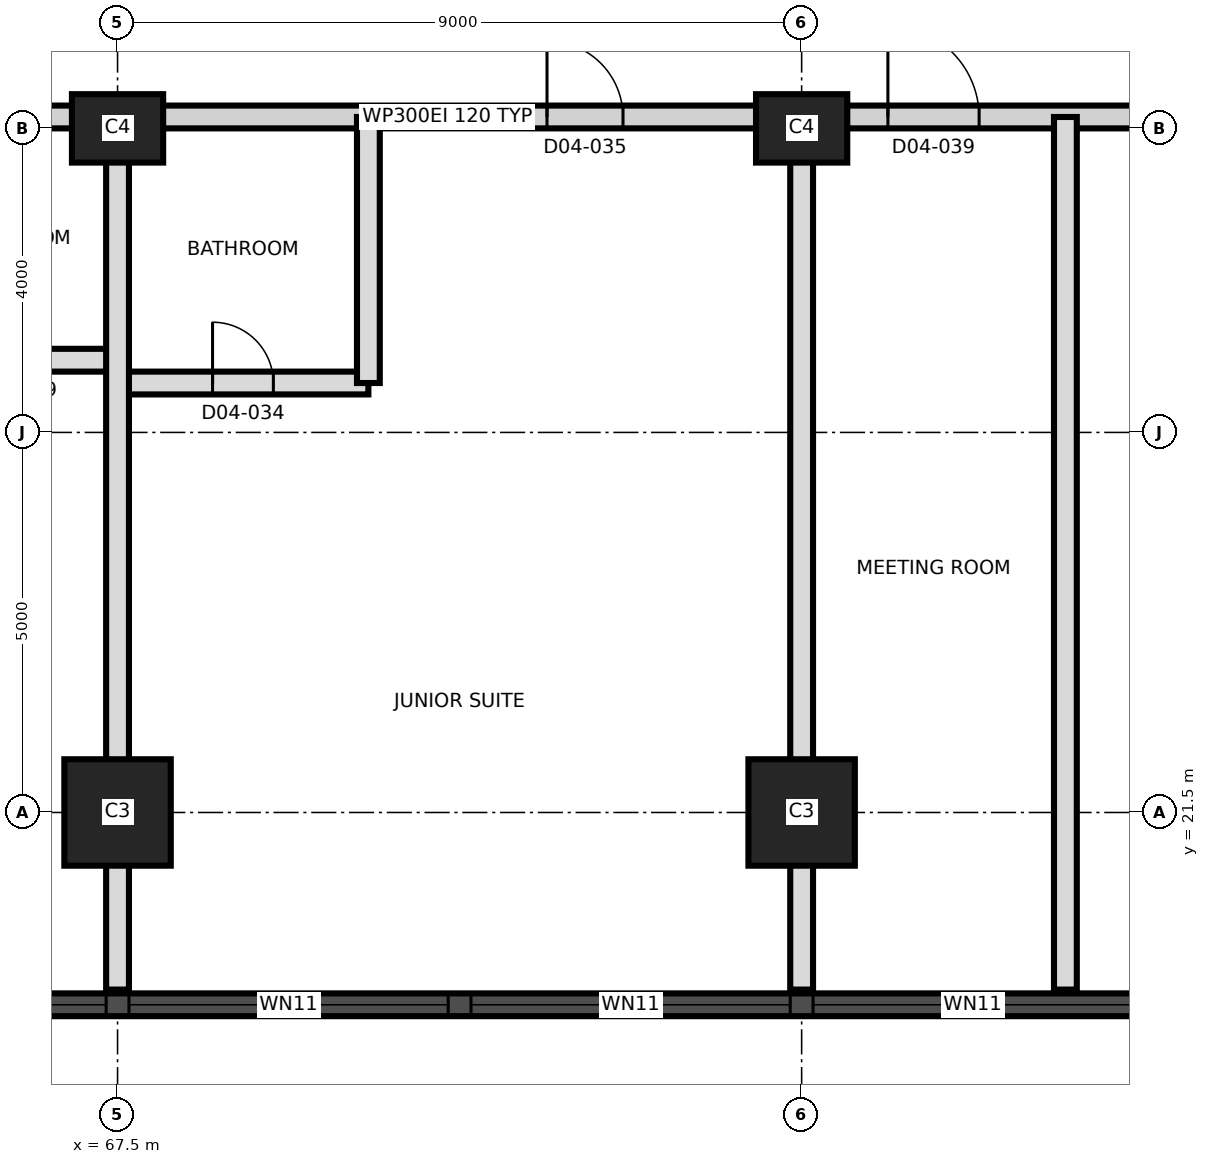
"""IFC4 building model, lengths in metres.
Left out: names, types, materials, properties, quantities, classifications, styles, units other than length and angle.
Written with IfcOpenShell. Run it as: python <this file> out.ifc"""

import sys

from ifc_helpers import new_model, si_unit, direction, frame, frame_2d, origin, origin_2d, place, context, subcontext, project, spatial, rectangle, extrude, element, fill, save


model = new_model("IFC4")
c1 = context("Model", 3, precision=1e-05, world=origin(), true_north=direction((0.0, 1.0)))
c2 = subcontext(c1, "Body", "Model", "MODEL_VIEW")
j1 = project(units=[si_unit("LENGTHUNIT", "METRE"), si_unit("PLANEANGLEUNIT", "RADIAN")], contexts=[c1])
p1 = place(None, origin())
s1 = spatial("IfcSite", under=j1, at=p1, CompositionType="ELEMENT")
p2 = place(p1, origin())
s2 = spatial("IfcBuilding", under=s1, at=p2, CompositionType="ELEMENT")
p3 = place(p2, frame((0.0, 0.0, 63.1)))
s3 = spatial("IfcBuildingStorey", under=s2, at=p3, CompositionType="ELEMENT", Elevation=63.1)
for number, where, z_axis, x_axis in (
    (1, (67.5, 21.5, 0.0), (0.0, 0.0, 1.0), (1.0, 0.0, 0.0)),
    (2, (76.5, 21.5, 0.0), (0.0, 0.0, 1.0), (1.0, 0.0, 0.0)),
):
    element("IfcColumn", number, at=place(p3, frame(where, z_axis=z_axis, x_axis=x_axis)), inside=s3, PredefinedType="COLUMN", context=c2, shape_type="SweptSolid", body=[
        extrude(rectangle(XDim=1.4, YDim=1.4, at=origin_2d()), origin(), (0.0, 0.0, 1.0), 3.7),
    ])
for number, where, z_axis, x_axis in (
    (3, (67.5, 30.5, 0.0), (0.0, 0.0, 1.0), (1.0, 0.0, 0.0)),
    (4, (76.5, 30.5, 0.0), (0.0, 0.0, 1.0), (1.0, 0.0, 0.0)),
):
    element("IfcColumn", number, at=place(p3, frame(where, z_axis=z_axis, x_axis=x_axis)), inside=s3, PredefinedType="COLUMN", context=c2, shape_type="SweptSolid", body=[
        extrude(rectangle(XDim=1.2, YDim=0.9, at=origin_2d()), origin(), (0.0, 0.0, 1.0), 3.7),
    ])
p4 = place(p3, frame((44.01, 18.97, 0.0), z_axis=(0.0, 0.0, 1.0), x_axis=(1.0, 0.0, 0.0)))
e5 = element("IfcWall", 5, at=p4, inside=s3, PredefinedType="SOLIDWALL", context=c2, shape_type="SweptSolid", body=[
    extrude(rectangle(XDim=43.478, YDim=0.3, at=frame_2d((21.739, 0.0))), origin(), (0.0, 0.0, 1.0), 3.4),
])
p5 = place(p4, frame((1.845, 0.0, 0.3)))
e6 = element("IfcOpeningElement", 6, at=p5, cuts=e5, PredefinedType="OPENING", context=c2, shape_type="SweptSolid", body=[
    extrude(rectangle(XDim=1.8, YDim=2.4, at=frame_2d((0.9, 1.2))), frame((0.0, 0.16, 0.0), z_axis=(0.0, -1.0, 0.0), x_axis=(1.0, 0.0, 0.0)), (0.0, 0.0, 1.0), 0.32),
])
p6 = place(p4, frame((5.64, 0.0, 0.9)))
e7 = element("IfcOpeningElement", 7, at=p6, cuts=e5, PredefinedType="OPENING", context=c2, shape_type="SweptSolid", body=[
    extrude(rectangle(XDim=4.2, YDim=1.5, at=frame_2d((2.1, 0.75))), frame((0.0, 0.16, 0.0), z_axis=(0.0, -1.0, 0.0), x_axis=(1.0, 0.0, 0.0)), (0.0, 0.0, 1.0), 0.32),
])
p7 = place(p4, frame((10.14, 0.0, 0.9)))
e8 = element("IfcOpeningElement", 8, at=p7, cuts=e5, PredefinedType="OPENING", context=c2, shape_type="SweptSolid", body=[
    extrude(rectangle(XDim=4.2, YDim=1.5, at=frame_2d((2.1, 0.75))), frame((0.0, 0.16, 0.0), z_axis=(0.0, -1.0, 0.0), x_axis=(1.0, 0.0, 0.0)), (0.0, 0.0, 1.0), 0.32),
])
p8 = place(p4, frame((14.64, 0.0, 0.9)))
e9 = element("IfcOpeningElement", 9, at=p8, cuts=e5, PredefinedType="OPENING", context=c2, shape_type="SweptSolid", body=[
    extrude(rectangle(XDim=4.2, YDim=1.5, at=frame_2d((2.1, 0.75))), frame((0.0, 0.16, 0.0), z_axis=(0.0, -1.0, 0.0), x_axis=(1.0, 0.0, 0.0)), (0.0, 0.0, 1.0), 0.32),
])
p9 = place(p4, frame((19.14, 0.0, 0.9)))
e10 = element("IfcOpeningElement", 10, at=p9, cuts=e5, PredefinedType="OPENING", context=c2, shape_type="SweptSolid", body=[
    extrude(rectangle(XDim=4.2, YDim=1.5, at=frame_2d((2.1, 0.75))), frame((0.0, 0.16, 0.0), z_axis=(0.0, -1.0, 0.0), x_axis=(1.0, 0.0, 0.0)), (0.0, 0.0, 1.0), 0.32),
])
p10 = place(p4, frame((23.64, 0.0, 0.9)))
e11 = element("IfcOpeningElement", 11, at=p10, cuts=e5, PredefinedType="OPENING", context=c2, shape_type="SweptSolid", body=[
    extrude(rectangle(XDim=4.2, YDim=1.5, at=frame_2d((2.1, 0.75))), frame((0.0, 0.16, 0.0), z_axis=(0.0, -1.0, 0.0), x_axis=(1.0, 0.0, 0.0)), (0.0, 0.0, 1.0), 0.32),
])
p11 = place(p4, frame((28.14, 0.0, 0.9)))
e12 = element("IfcOpeningElement", 12, at=p11, cuts=e5, PredefinedType="OPENING", context=c2, shape_type="SweptSolid", body=[
    extrude(rectangle(XDim=4.2, YDim=1.5, at=frame_2d((2.1, 0.75))), frame((0.0, 0.16, 0.0), z_axis=(0.0, -1.0, 0.0), x_axis=(1.0, 0.0, 0.0)), (0.0, 0.0, 1.0), 0.32),
])
p12 = place(p4, frame((32.64, 0.0, 0.9)))
e13 = element("IfcOpeningElement", 13, at=p12, cuts=e5, PredefinedType="OPENING", context=c2, shape_type="SweptSolid", body=[
    extrude(rectangle(XDim=4.2, YDim=1.5, at=frame_2d((2.1, 0.75))), frame((0.0, 0.16, 0.0), z_axis=(0.0, -1.0, 0.0), x_axis=(1.0, 0.0, 0.0)), (0.0, 0.0, 1.0), 0.32),
])
p13 = place(p4, frame((37.14, 0.0, 0.9)))
e14 = element("IfcOpeningElement", 14, at=p13, cuts=e5, PredefinedType="OPENING", context=c2, shape_type="SweptSolid", body=[
    extrude(rectangle(XDim=4.2, YDim=1.5, at=frame_2d((2.1, 0.75))), frame((0.0, 0.16, 0.0), z_axis=(0.0, -1.0, 0.0), x_axis=(1.0, 0.0, 0.0)), (0.0, 0.0, 1.0), 0.32),
])
p14 = place(p3, frame((67.5, 27.15, 0.0), z_axis=(0.0, 0.0, 1.0), x_axis=(1.0, 0.0, 0.0)))
e15 = element("IfcWall", 15, at=p14, inside=s3, PredefinedType="PARTITIONING", context=c2, shape_type="SweptSolid", body=[
    extrude(rectangle(XDim=3.3, YDim=0.3, at=frame_2d((1.65, 0.0))), origin(), (0.0, 0.0, 1.0), 3.4),
])
p15 = place(p14, frame((1.25, 0.0, 0.0)))
e16 = element("IfcOpeningElement", 16, at=p15, cuts=e15, PredefinedType="OPENING", context=c2, shape_type="SweptSolid", body=[
    extrude(rectangle(XDim=0.8, YDim=2.1, at=frame_2d((0.4, 1.05))), frame((0.0, 0.16, 0.0), z_axis=(0.0, -1.0, 0.0), x_axis=(1.0, 0.0, 0.0)), (0.0, 0.0, 1.0), 0.32),
])
p16 = place(p3, frame((64.8, 27.45, 0.0), z_axis=(0.0, 0.0, 1.0), x_axis=(1.0, 0.0, 0.0)))
e17 = element("IfcWall", 17, at=p16, inside=s3, PredefinedType="PARTITIONING", context=c2, shape_type="SweptSolid", body=[
    extrude(rectangle(XDim=2.7, YDim=0.3, at=frame_2d((1.35, 0.0))), origin(), (0.0, 0.0, 1.0), 3.4),
])
p17 = place(p16, frame((0.95, 0.0, 0.0)))
e18 = element("IfcOpeningElement", 18, at=p17, cuts=e17, PredefinedType="OPENING", context=c2, shape_type="SweptSolid", body=[
    extrude(rectangle(XDim=0.8, YDim=2.1, at=frame_2d((0.4, 1.05))), frame((0.0, 0.16, 0.0), z_axis=(0.0, -1.0, 0.0), x_axis=(1.0, 0.0, 0.0)), (0.0, 0.0, 1.0), 0.32),
])
p18 = place(p3, frame((58.95, 30.65, 0.0), z_axis=(0.0, 0.0, 1.0), x_axis=(1.0, 0.0, 0.0)))
e19 = element("IfcWall", 19, at=p18, inside=s3, PredefinedType="PARTITIONING", context=c2, shape_type="SweptSolid", body=[
    extrude(rectangle(XDim=26.38, YDim=0.3, at=frame_2d((13.19, 0.0))), origin(), (0.0, 0.0, 1.0), 3.4),
])
p19 = place(p18, frame((1.25, 0.0, 0.0)))
e20 = element("IfcOpeningElement", 20, at=p19, cuts=e19, PredefinedType="OPENING", context=c2, shape_type="SweptSolid", body=[
    extrude(rectangle(XDim=1.2, YDim=2.1, at=frame_2d((0.6, 1.05))), frame((0.0, 0.16, 0.0), z_axis=(0.0, -1.0, 0.0), x_axis=(1.0, 0.0, 0.0)), (0.0, 0.0, 1.0), 0.32),
])
p20 = place(p18, frame((4.5, 0.0, 0.0)))
e21 = element("IfcOpeningElement", 21, at=p20, cuts=e19, PredefinedType="OPENING", context=c2, shape_type="SweptSolid", body=[
    extrude(rectangle(XDim=1.0, YDim=2.1, at=frame_2d((0.5, 1.05))), frame((0.0, 0.16, 0.0), z_axis=(0.0, -1.0, 0.0), x_axis=(1.0, 0.0, 0.0)), (0.0, 0.0, 1.0), 0.32),
])
p21 = place(p18, frame((14.2, 0.0, 0.0)))
e22 = element("IfcOpeningElement", 22, at=p21, cuts=e19, PredefinedType="OPENING", context=c2, shape_type="SweptSolid", body=[
    extrude(rectangle(XDim=1.0, YDim=2.4, at=frame_2d((0.5, 1.2))), frame((0.0, 0.16, 0.0), z_axis=(0.0, -1.0, 0.0), x_axis=(1.0, 0.0, 0.0)), (0.0, 0.0, 1.0), 0.32),
])
p22 = place(p18, frame((18.685, 0.0, 0.0)))
e23 = element("IfcOpeningElement", 23, at=p22, cuts=e19, PredefinedType="OPENING", context=c2, shape_type="SweptSolid", body=[
    extrude(rectangle(XDim=1.2, YDim=2.1, at=frame_2d((0.6, 1.05))), frame((0.0, 0.16, 0.0), z_axis=(0.0, -1.0, 0.0), x_axis=(1.0, 0.0, 0.0)), (0.0, 0.0, 1.0), 0.32),
])
p23 = place(p18, frame((21.935, 0.0, 0.0)))
e24 = element("IfcOpeningElement", 24, at=p23, cuts=e19, PredefinedType="OPENING", context=c2, shape_type="SweptSolid", body=[
    extrude(rectangle(XDim=1.0, YDim=2.1, at=frame_2d((0.5, 1.05))), frame((0.0, 0.16, 0.0), z_axis=(0.0, -1.0, 0.0), x_axis=(1.0, 0.0, 0.0)), (0.0, 0.0, 1.0), 0.32),
])
p24 = place(p3, frame((67.5, 19.17, 0.0), z_axis=(0.0, 0.0, 1.0), x_axis=(0.0, 1.0, 0.0)))
e25 = element("IfcWall", 25, at=p24, inside=s3, PredefinedType="PARTITIONING", context=c2, shape_type="SweptSolid", body=[
    extrude(rectangle(XDim=11.48, YDim=0.3, at=frame_2d((5.74, 0.0))), origin(), (0.0, 0.0, 1.0), 3.4),
])
p25 = place(p3, frame((70.8, 27.15, 0.0), z_axis=(0.0, 0.0, 1.0), x_axis=(0.0, 1.0, 0.0)))
e26 = element("IfcWall", 26, at=p25, inside=s3, PredefinedType="PARTITIONING", context=c2, shape_type="SweptSolid", body=[
    extrude(rectangle(XDim=3.5, YDim=0.3, at=frame_2d((1.75, 0.0))), origin(), (0.0, 0.0, 1.0), 3.4),
])
for number, where, z_axis, x_axis in (
    (27, (76.5, 19.17, 0.0), (0.0, 0.0, 1.0), (0.0, 1.0, 0.0)),
    (28, (79.97, 19.17, 0.0), (0.0, 0.0, 1.0), (0.0, 1.0, 0.0)),
):
    element("IfcWall", number, at=place(p3, frame(where, z_axis=z_axis, x_axis=x_axis)), inside=s3, PredefinedType="PARTITIONING", context=c2, shape_type="SweptSolid", body=[
        extrude(rectangle(XDim=11.48, YDim=0.3, at=frame_2d((5.74, 0.0))), origin(), (0.0, 0.0, 1.0), 3.4),
    ])
p26 = place(p9, origin())
e29 = element("IfcWindow", 29, at=p26, inside=s3, PartitioningType="SINGLE_PANEL", PredefinedType="WINDOW", context=c2, shape_type="SweptSolid", body=[
    extrude(rectangle(XDim=4.2, YDim=1.5, at=frame_2d((2.1, 0.75))), frame((0.0, 0.03, 0.0), z_axis=(0.0, -1.0, 0.0), x_axis=(1.0, 0.0, 0.0)), (0.0, 0.0, 1.0), 0.06),
])
fill(e10, e29)
p27 = place(p10, origin())
e30 = element("IfcWindow", 30, at=p27, inside=s3, PartitioningType="SINGLE_PANEL", PredefinedType="WINDOW", context=c2, shape_type="SweptSolid", body=[
    extrude(rectangle(XDim=4.2, YDim=1.5, at=frame_2d((2.1, 0.75))), frame((0.0, 0.03, 0.0), z_axis=(0.0, -1.0, 0.0), x_axis=(1.0, 0.0, 0.0)), (0.0, 0.0, 1.0), 0.06),
])
fill(e11, e30)
p28 = place(p11, origin())
e31 = element("IfcWindow", 31, at=p28, inside=s3, PartitioningType="SINGLE_PANEL", PredefinedType="WINDOW", context=c2, shape_type="SweptSolid", body=[
    extrude(rectangle(XDim=4.2, YDim=1.5, at=frame_2d((2.1, 0.75))), frame((0.0, 0.03, 0.0), z_axis=(0.0, -1.0, 0.0), x_axis=(1.0, 0.0, 0.0)), (0.0, 0.0, 1.0), 0.06),
])
fill(e12, e31)
p29 = place(p12, origin())
e32 = element("IfcWindow", 32, at=p29, inside=s3, PartitioningType="SINGLE_PANEL", PredefinedType="WINDOW", context=c2, shape_type="SweptSolid", body=[
    extrude(rectangle(XDim=4.2, YDim=1.5, at=frame_2d((2.1, 0.75))), frame((0.0, 0.03, 0.0), z_axis=(0.0, -1.0, 0.0), x_axis=(1.0, 0.0, 0.0)), (0.0, 0.0, 1.0), 0.06),
])
fill(e13, e32)
p30 = place(p15, origin())
e33 = element("IfcDoor", 33, at=p30, inside=s3, OperationType="SINGLE_SWING_LEFT", PredefinedType="DOOR", context=c2, shape_type="SweptSolid", body=[
    extrude(rectangle(XDim=0.8, YDim=2.1, at=frame_2d((0.4, 1.05))), frame((0.0, 0.025, 0.0), z_axis=(0.0, -1.0, 0.0), x_axis=(1.0, 0.0, 0.0)), (0.0, 0.0, 1.0), 0.05),
])
fill(e16, e33)
p31 = place(p21, origin())
e34 = element("IfcDoor", 34, at=p31, inside=s3, OperationType="SINGLE_SWING_RIGHT", PredefinedType="DOOR", context=c2, shape_type="SweptSolid", body=[
    extrude(rectangle(XDim=1.0, YDim=2.4, at=frame_2d((0.5, 1.2))), frame((0.0, 0.025, 0.0), z_axis=(0.0, -1.0, 0.0), x_axis=(1.0, 0.0, 0.0)), (0.0, 0.0, 1.0), 0.05),
])
fill(e22, e34)
p32 = place(p22, origin())
e35 = element("IfcDoor", 35, at=p32, inside=s3, OperationType="SINGLE_SWING_LEFT", PredefinedType="DOOR", context=c2, shape_type="SweptSolid", body=[
    extrude(rectangle(XDim=1.2, YDim=2.1, at=frame_2d((0.6, 1.05))), frame((0.0, 0.025, 0.0), z_axis=(0.0, -1.0, 0.0), x_axis=(1.0, 0.0, 0.0)), (0.0, 0.0, 1.0), 0.05),
])
fill(e23, e35)
save(model, sys.argv[1])
